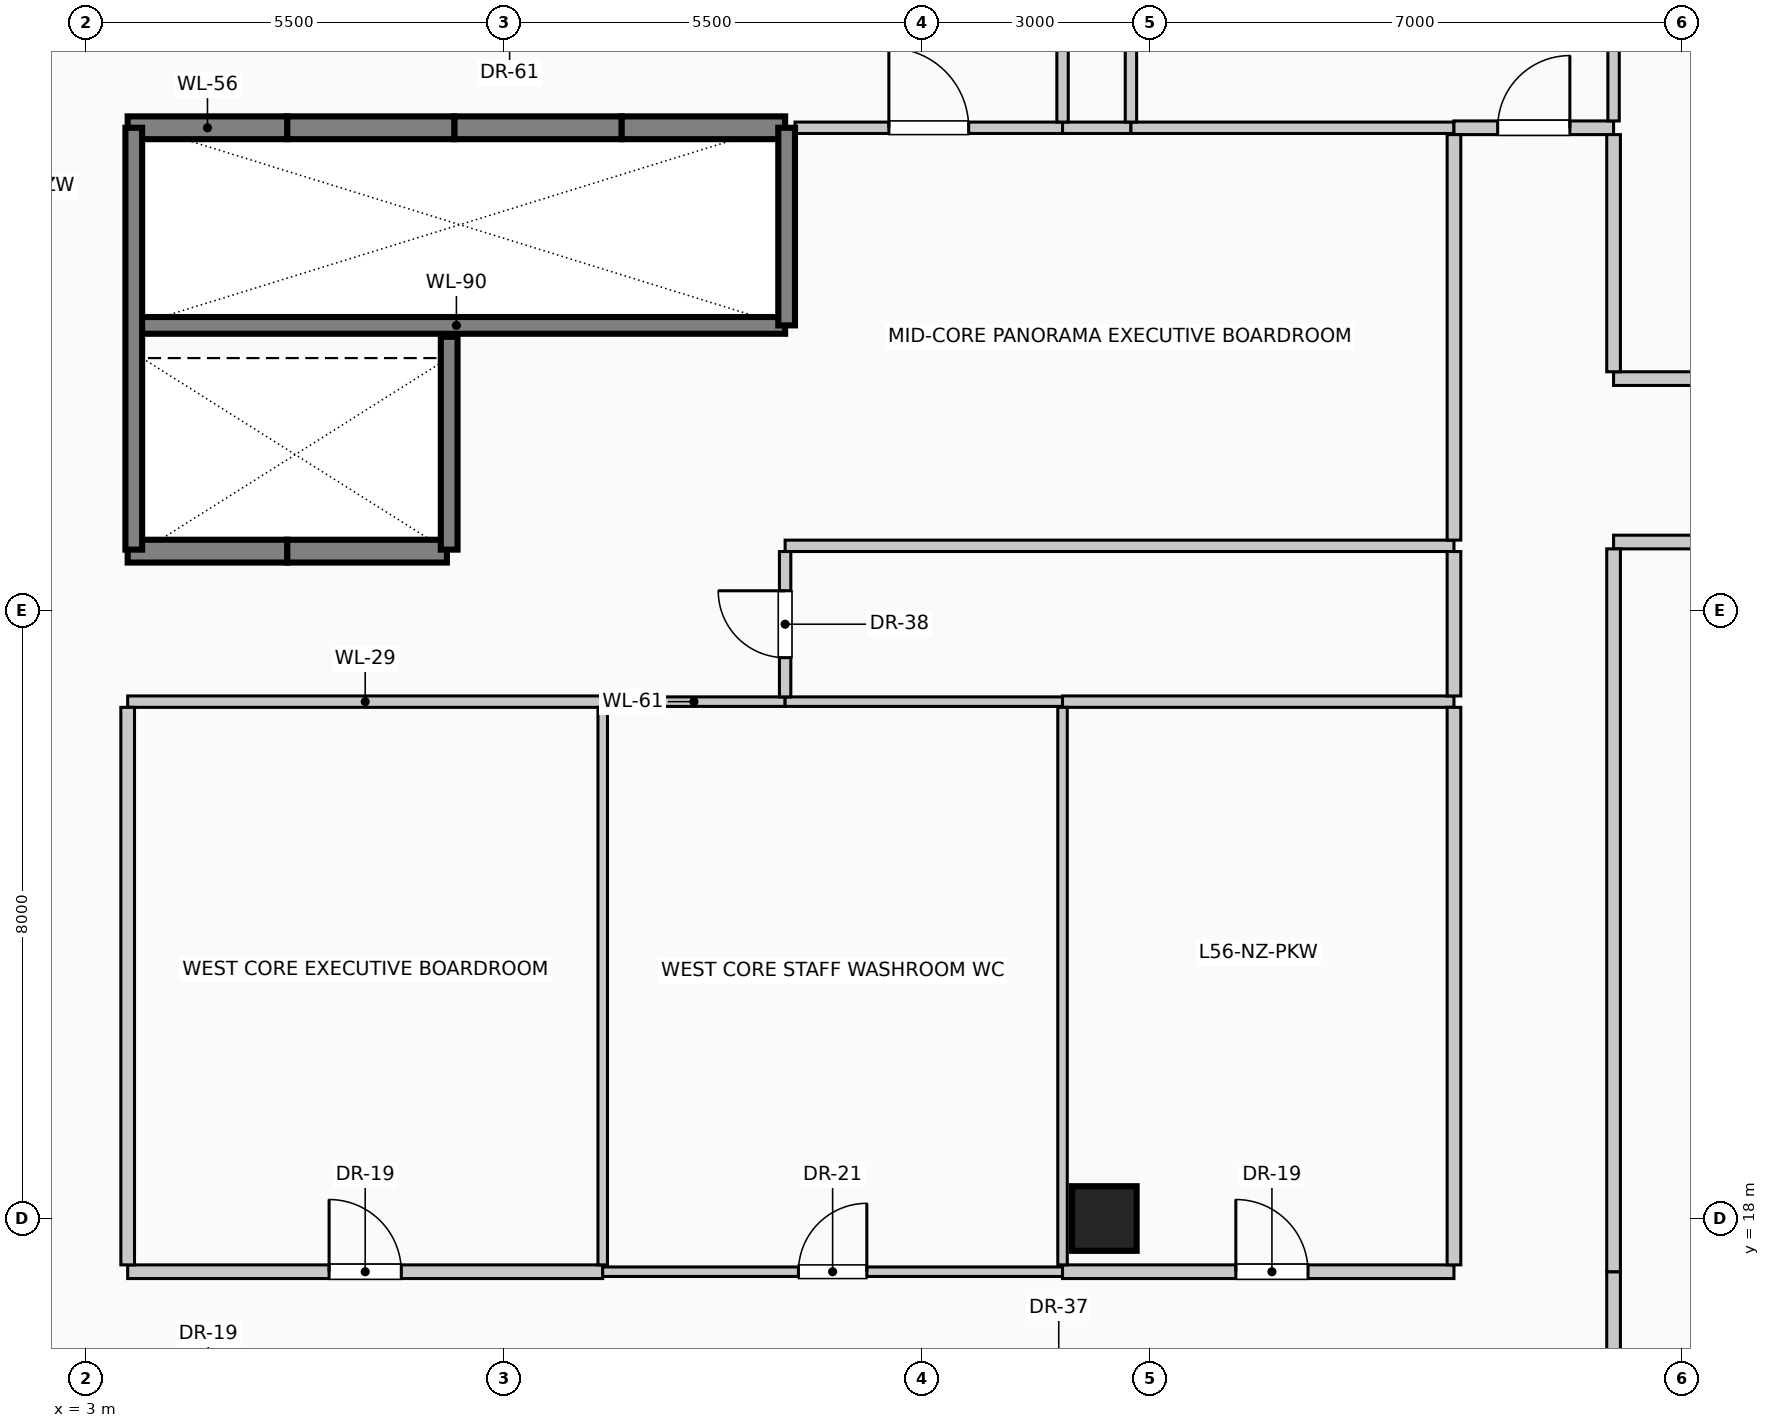
"""IFC4 building model, lengths in metres.
Left out: names, types, materials, properties, quantities, classifications, styles, units other than length and angle.
Written with IfcOpenShell. Run it as: python <this file> out.ifc"""

import sys

from ifc_helpers import new_model, si_unit, direction, frame, frame_2d, origin, origin_2d, place, context, subcontext, project, spatial, rectangle, circle, extrude, element, fill, save


model = new_model("IFC4")
c1 = context("Model", 3, precision=1e-05, world=origin(), true_north=direction((0.0, 1.0)))
c2 = subcontext(c1, "Body", "Model", "MODEL_VIEW")
j1 = project(units=[si_unit("LENGTHUNIT", "METRE"), si_unit("PLANEANGLEUNIT", "RADIAN")], contexts=[c1])
p1 = place(None, origin())
s1 = spatial("IfcSite", under=j1, at=p1, CompositionType="ELEMENT")
p2 = place(p1, origin())
s2 = spatial("IfcBuilding", under=s1, at=p2, CompositionType="ELEMENT")
p3 = place(p2, frame((0.0, 0.0, 230.6)))
s3 = spatial("IfcBuildingStorey", under=s2, at=p3, CompositionType="ELEMENT", Elevation=230.6)
p4 = place(p3, frame((16.4, 18.0, 0.0), z_axis=(0.0, 0.0, 1.0), x_axis=(1.0, 0.0, 0.0)))
e1 = element("IfcColumn", 1, at=p4, inside=s3, PredefinedType="COLUMN", context=c2, shape_type="SweptSolid", body=[
    extrude(circle(Radius=0.425, at=origin_2d()), origin(), (0.0, 0.0, 1.0), 4.0),
])
p5 = place(p3, frame((3.55, 32.35, 0.0), z_axis=(0.0, 0.0, 1.0), x_axis=(1.0, 0.0, 0.0)))
e2 = element("IfcWall", 2, at=p5, inside=s3, PredefinedType="SOLIDWALL", context=c2, shape_type="SweptSolid", body=[
    extrude(rectangle(XDim=2.1, YDim=0.3, at=frame_2d((1.05, 0.0))), origin(), (0.0, 0.0, 1.0), 4.0),
])
p6 = place(p3, frame((5.65, 32.35, 0.0), z_axis=(0.0, 0.0, 1.0), x_axis=(1.0, 0.0, 0.0)))
e3 = element("IfcWall", 3, at=p6, inside=s3, PredefinedType="SOLIDWALL", context=c2, shape_type="SweptSolid", body=[
    extrude(rectangle(XDim=2.2, YDim=0.3, at=frame_2d((1.1, 0.0))), origin(), (0.0, 0.0, 1.0), 4.0),
])
p7 = place(p3, frame((7.85, 32.35, 0.0), z_axis=(0.0, 0.0, 1.0), x_axis=(1.0, 0.0, 0.0)))
e4 = element("IfcWall", 4, at=p7, inside=s3, PredefinedType="SOLIDWALL", context=c2, shape_type="SweptSolid", body=[
    extrude(rectangle(XDim=2.2, YDim=0.3, at=frame_2d((1.1, 0.0))), origin(), (0.0, 0.0, 1.0), 4.0),
])
p8 = place(p3, frame((10.05, 32.35, 0.0), z_axis=(0.0, 0.0, 1.0), x_axis=(1.0, 0.0, 0.0)))
e5 = element("IfcWall", 5, at=p8, inside=s3, PredefinedType="SOLIDWALL", context=c2, shape_type="SweptSolid", body=[
    extrude(rectangle(XDim=2.15, YDim=0.3, at=frame_2d((1.075, 0.0))), origin(), (0.0, 0.0, 1.0), 4.0),
])
p9 = place(p3, frame((5.65, 26.78, 0.0), z_axis=(0.0, 0.0, 1.0), x_axis=(-1.0, 0.0, 0.0)))
e6 = element("IfcWall", 6, at=p9, inside=s3, PredefinedType="SOLIDWALL", context=c2, shape_type="SweptSolid", body=[
    extrude(rectangle(XDim=2.1, YDim=0.3, at=frame_2d((1.05, 0.0))), origin(), (0.0, 0.0, 1.0), 4.0),
])
p10 = place(p3, frame((7.75, 26.78, 0.0), z_axis=(0.0, 0.0, 1.0), x_axis=(-1.0, 0.0, 0.0)))
e7 = element("IfcWall", 7, at=p10, inside=s3, PredefinedType="SOLIDWALL", context=c2, shape_type="SweptSolid", body=[
    extrude(rectangle(XDim=2.1, YDim=0.3, at=frame_2d((1.05, 0.0))), origin(), (0.0, 0.0, 1.0), 4.0),
])
p11 = place(p3, frame((3.55, 29.75, 0.0), z_axis=(0.0, 0.0, 1.0), x_axis=(1.0, 0.0, 0.0)))
e8 = element("IfcWall", 8, at=p11, inside=s3, PredefinedType="SOLIDWALL", context=c2, shape_type="SweptSolid", body=[
    extrude(rectangle(XDim=8.65, YDim=0.22, at=frame_2d((4.325, 0.0))), origin(), (0.0, 0.0, 1.0), 4.0),
])
p12 = place(p3, frame((3.63, 26.8, 0.0), z_axis=(0.0, 0.0, 1.0), x_axis=(0.0, 1.0, 0.0)))
e9 = element("IfcWall", 9, at=p12, inside=s3, PredefinedType="SOLIDWALL", context=c2, shape_type="SweptSolid", body=[
    extrude(rectangle(XDim=5.55, YDim=0.22, at=frame_2d((2.775, 0.0))), origin(), (0.0, 0.0, 1.0), 4.0),
])
p13 = place(p3, frame((7.78, 26.8, 0.0), z_axis=(0.0, 0.0, 1.0), x_axis=(0.0, 1.0, 0.0)))
e10 = element("IfcWall", 10, at=p13, inside=s3, PredefinedType="SOLIDWALL", context=c2, shape_type="SweptSolid", body=[
    extrude(rectangle(XDim=2.8, YDim=0.22, at=frame_2d((1.4, 0.0))), origin(), (0.0, 0.0, 1.0), 4.0),
])
p14 = place(p3, frame((12.22, 29.75, 0.0), z_axis=(0.0, 0.0, 1.0), x_axis=(0.0, 1.0, 0.0)))
e11 = element("IfcWall", 11, at=p14, inside=s3, PredefinedType="SOLIDWALL", context=c2, shape_type="SweptSolid", body=[
    extrude(rectangle(XDim=2.6, YDim=0.22, at=frame_2d((1.3, 0.0))), origin(), (0.0, 0.0, 1.0), 4.0),
])
p15 = place(p3, frame((3.55, 17.3, 0.0), z_axis=(0.0, 0.0, 1.0), x_axis=(1.0, 0.0, 0.0)))
e12 = element("IfcWall", 12, at=p15, inside=s3, PredefinedType="PARTITIONING", context=c2, shape_type="SweptSolid", body=[
    extrude(rectangle(XDim=6.25, YDim=0.18, at=frame_2d((3.125, 0.0))), origin(), (0.0, 0.0, 1.0), 3.75),
])
p16 = place(p15, frame((2.65, 0.0, 0.0)))
e13 = element("IfcOpeningElement", 13, at=p16, cuts=e12, PredefinedType="OPENING", context=c2, shape_type="SweptSolid", body=[
    extrude(rectangle(XDim=0.95, YDim=2.15, at=frame_2d((0.475, 1.075))), frame((0.0, 0.1, 0.0), z_axis=(0.0, -1.0, 0.0), x_axis=(1.0, 0.0, 0.0)), (0.0, 0.0, 1.0), 0.2),
])
p17 = place(p3, frame((9.8, 17.3, 0.0), z_axis=(0.0, 0.0, 1.0), x_axis=(1.0, 0.0, 0.0)))
e14 = element("IfcWall", 14, at=p17, inside=s3, PredefinedType="PARTITIONING", context=c2, shape_type="SweptSolid", body=[
    extrude(rectangle(XDim=6.05, YDim=0.125, at=frame_2d((3.025, 0.0))), origin(), (0.0, 0.0, 1.0), 3.75),
])
p18 = place(p17, frame((2.575, 0.0, 0.0)))
e15 = element("IfcOpeningElement", 15, at=p18, cuts=e14, PredefinedType="OPENING", context=c2, shape_type="SweptSolid", body=[
    extrude(rectangle(XDim=0.9, YDim=2.1, at=frame_2d((0.45, 1.05))), frame((0.0, 0.073, 0.0), z_axis=(0.0, -1.0, 0.0), x_axis=(1.0, 0.0, 0.0)), (0.0, 0.0, 1.0), 0.145),
])
p19 = place(p3, frame((15.85, 17.3, 0.0), z_axis=(0.0, 0.0, 1.0), x_axis=(1.0, 0.0, 0.0)))
e16 = element("IfcWall", 16, at=p19, inside=s3, PredefinedType="PARTITIONING", context=c2, shape_type="SweptSolid", body=[
    extrude(rectangle(XDim=5.15, YDim=0.18, at=frame_2d((2.575, 0.0))), origin(), (0.0, 0.0, 1.0), 3.75),
])
p20 = place(p19, frame((2.28, 0.0, 0.0)))
e17 = element("IfcOpeningElement", 17, at=p20, cuts=e16, PredefinedType="OPENING", context=c2, shape_type="SweptSolid", body=[
    extrude(rectangle(XDim=0.95, YDim=2.15, at=frame_2d((0.475, 1.075))), frame((0.0, 0.1, 0.0), z_axis=(0.0, -1.0, 0.0), x_axis=(1.0, 0.0, 0.0)), (0.0, 0.0, 1.0), 0.2),
])
p21 = place(p3, frame((3.55, 24.8, 0.0), z_axis=(0.0, 0.0, 1.0), x_axis=(1.0, 0.0, 0.0)))
e18 = element("IfcWall", 18, at=p21, inside=s3, PredefinedType="PARTITIONING", context=c2, shape_type="SweptSolid", body=[
    extrude(rectangle(XDim=6.25, YDim=0.15, at=frame_2d((3.125, 0.0))), origin(), (0.0, 0.0, 1.0), 3.75),
])
p22 = place(p3, frame((9.8, 24.8, 0.0), z_axis=(0.0, 0.0, 1.0), x_axis=(1.0, 0.0, 0.0)))
e19 = element("IfcWall", 19, at=p22, inside=s3, PredefinedType="PARTITIONING", context=c2, shape_type="SweptSolid", body=[
    extrude(rectangle(XDim=2.4, YDim=0.125, at=frame_2d((1.2, 0.0))), origin(), (0.0, 0.0, 1.0), 3.75),
])
p23 = place(p3, frame((12.2, 24.8, 0.0), z_axis=(0.0, 0.0, 1.0), x_axis=(1.0, 0.0, 0.0)))
e20 = element("IfcWall", 20, at=p23, inside=s3, PredefinedType="PARTITIONING", context=c2, shape_type="SweptSolid", body=[
    extrude(rectangle(XDim=3.65, YDim=0.125, at=frame_2d((1.825, 0.0))), origin(), (0.0, 0.0, 1.0), 3.75),
])
p24 = place(p3, frame((15.85, 24.8, 0.0), z_axis=(0.0, 0.0, 1.0), x_axis=(1.0, 0.0, 0.0)))
e21 = element("IfcWall", 21, at=p24, inside=s3, PredefinedType="PARTITIONING", context=c2, shape_type="SweptSolid", body=[
    extrude(rectangle(XDim=5.15, YDim=0.15, at=frame_2d((2.575, 0.0))), origin(), (0.0, 0.0, 1.0), 3.75),
])
p25 = place(p3, frame((12.2, 26.85, 0.0), z_axis=(0.0, 0.0, 1.0), x_axis=(1.0, 0.0, 0.0)))
e22 = element("IfcWall", 22, at=p25, inside=s3, PredefinedType="PARTITIONING", context=c2, shape_type="SweptSolid", body=[
    extrude(rectangle(XDim=8.8, YDim=0.15, at=frame_2d((4.4, 0.0))), origin(), (0.0, 0.0, 1.0), 3.75),
])
p26 = place(p3, frame((23.1, 26.9, 0.0), z_axis=(0.0, 0.0, 1.0), x_axis=(1.0, 0.0, 0.0)))
e23 = element("IfcWall", 23, at=p26, inside=s3, PredefinedType="PARTITIONING", context=c2, shape_type="SweptSolid", body=[
    extrude(rectangle(XDim=9.1, YDim=0.18, at=frame_2d((4.55, 0.0))), origin(), (0.0, 0.0, 1.0), 3.75),
])
p27 = place(p26, frame((4.075, 0.0, 0.0)))
e24 = element("IfcOpeningElement", 24, at=p27, cuts=e23, PredefinedType="OPENING", context=c2, shape_type="SweptSolid", body=[
    extrude(rectangle(XDim=0.95, YDim=2.15, at=frame_2d((0.475, 1.075))), frame((0.0, 0.1, 0.0), z_axis=(0.0, -1.0, 0.0), x_axis=(1.0, 0.0, 0.0)), (0.0, 0.0, 1.0), 0.2),
])
p28 = place(p3, frame((23.1, 29.05, 0.0), z_axis=(0.0, 0.0, 1.0), x_axis=(1.0, 0.0, 0.0)))
e25 = element("IfcWall", 25, at=p28, inside=s3, PredefinedType="PARTITIONING", context=c2, shape_type="SweptSolid", body=[
    extrude(rectangle(XDim=3.66, YDim=0.18, at=frame_2d((1.83, 0.0))), origin(), (0.0, 0.0, 1.0), 3.75),
])
p29 = place(p28, frame((1.355, 0.0, 0.0)))
e26 = element("IfcOpeningElement", 26, at=p29, cuts=e25, PredefinedType="OPENING", context=c2, shape_type="SweptSolid", body=[
    extrude(rectangle(XDim=0.95, YDim=2.15, at=frame_2d((0.475, 1.075))), frame((0.0, 0.1, 0.0), z_axis=(0.0, -1.0, 0.0), x_axis=(1.0, 0.0, 0.0)), (0.0, 0.0, 1.0), 0.2),
])
p30 = place(p3, frame((12.33, 32.35, 0.0), z_axis=(0.0, 0.0, 1.0), x_axis=(1.0, 0.0, 0.0)))
e27 = element("IfcWall", 27, at=p30, inside=s3, PredefinedType="PARTITIONING", context=c2, shape_type="SweptSolid", body=[
    extrude(rectangle(XDim=3.52, YDim=0.15, at=frame_2d((1.76, 0.0))), origin(), (0.0, 0.0, 1.0), 3.75),
])
p31 = place(p30, frame((1.235, 0.0, 0.0)))
e28 = element("IfcOpeningElement", 28, at=p31, cuts=e27, PredefinedType="OPENING", context=c2, shape_type="SweptSolid", body=[
    extrude(rectangle(XDim=1.05, YDim=2.15, at=frame_2d((0.525, 1.075))), frame((0.0, 0.085, 0.0), z_axis=(0.0, -1.0, 0.0), x_axis=(1.0, 0.0, 0.0)), (0.0, 0.0, 1.0), 0.17),
])
p32 = place(p3, frame((15.85, 32.35, 0.0), z_axis=(0.0, 0.0, 1.0), x_axis=(1.0, 0.0, 0.0)))
e29 = element("IfcWall", 29, at=p32, inside=s3, PredefinedType="PARTITIONING", context=c2, shape_type="SweptSolid", body=[
    extrude(rectangle(XDim=0.9, YDim=0.15, at=frame_2d((0.45, 0.0))), origin(), (0.0, 0.0, 1.0), 3.75),
])
p33 = place(p3, frame((16.75, 32.35, 0.0), z_axis=(0.0, 0.0, 1.0), x_axis=(1.0, 0.0, 0.0)))
e30 = element("IfcWall", 30, at=p33, inside=s3, PredefinedType="PARTITIONING", context=c2, shape_type="SweptSolid", body=[
    extrude(rectangle(XDim=4.25, YDim=0.15, at=frame_2d((2.125, 0.0))), origin(), (0.0, 0.0, 1.0), 3.75),
])
p34 = place(p3, frame((21.0, 32.35, 0.0), z_axis=(0.0, 0.0, 1.0), x_axis=(1.0, 0.0, 0.0)))
e31 = element("IfcWall", 31, at=p34, inside=s3, PredefinedType="PARTITIONING", context=c2, shape_type="SweptSolid", body=[
    extrude(rectangle(XDim=2.1, YDim=0.18, at=frame_2d((1.05, 0.0))), origin(), (0.0, 0.0, 1.0), 3.75),
])
p35 = place(p34, frame((0.575, 0.0, 0.0)))
e32 = element("IfcOpeningElement", 32, at=p35, cuts=e31, PredefinedType="OPENING", context=c2, shape_type="SweptSolid", body=[
    extrude(rectangle(XDim=0.95, YDim=2.15, at=frame_2d((0.475, 1.075))), frame((0.0, 0.1, 0.0), z_axis=(0.0, -1.0, 0.0), x_axis=(1.0, 0.0, 0.0)), (0.0, 0.0, 1.0), 0.2),
])
p36 = place(p3, frame((3.55, 17.39, 0.0), z_axis=(0.0, 0.0, 1.0), x_axis=(0.0, 1.0, 0.0)))
e33 = element("IfcWall", 33, at=p36, inside=s3, PredefinedType="PARTITIONING", context=c2, shape_type="SweptSolid", body=[
    extrude(rectangle(XDim=7.335, YDim=0.18, at=frame_2d((3.667, 0.0))), origin(), (0.0, 0.0, 1.0), 3.75),
])
p37 = place(p3, frame((9.8, 17.39, 0.0), z_axis=(0.0, 0.0, 1.0), x_axis=(0.0, 1.0, 0.0)))
e34 = element("IfcWall", 34, at=p37, inside=s3, PredefinedType="PARTITIONING", context=c2, shape_type="SweptSolid", body=[
    extrude(rectangle(XDim=7.335, YDim=0.125, at=frame_2d((3.667, 0.0))), origin(), (0.0, 0.0, 1.0), 3.75),
])
p38 = place(p3, frame((12.2, 24.863, 0.0), z_axis=(0.0, 0.0, 1.0), x_axis=(0.0, 1.0, 0.0)))
e35 = element("IfcWall", 35, at=p38, inside=s3, PredefinedType="PARTITIONING", context=c2, shape_type="SweptSolid", body=[
    extrude(rectangle(XDim=1.912, YDim=0.15, at=frame_2d((0.956, 0.0))), origin(), (0.0, 0.0, 1.0), 3.75),
])
p39 = place(p38, frame((0.516, 0.0, 0.0)))
e36 = element("IfcOpeningElement", 36, at=p39, cuts=e35, PredefinedType="OPENING", context=c2, shape_type="SweptSolid", body=[
    extrude(rectangle(XDim=0.88, YDim=2.1, at=frame_2d((0.44, 1.05))), frame((0.0, 0.085, 0.0), z_axis=(0.0, -1.0, 0.0), x_axis=(1.0, 0.0, 0.0)), (0.0, 0.0, 1.0), 0.17),
])
p40 = place(p3, frame((15.85, 17.39, 0.0), z_axis=(0.0, 0.0, 1.0), x_axis=(0.0, 1.0, 0.0)))
e37 = element("IfcWall", 37, at=p40, inside=s3, PredefinedType="PARTITIONING", context=c2, shape_type="SweptSolid", body=[
    extrude(rectangle(XDim=7.335, YDim=0.125, at=frame_2d((3.667, 0.0))), origin(), (0.0, 0.0, 1.0), 3.75),
])
p41 = place(p3, frame((15.85, 32.425, 0.0), z_axis=(0.0, 0.0, 1.0), x_axis=(0.0, 1.0, 0.0)))
e38 = element("IfcWall", 38, at=p41, inside=s3, PredefinedType="PARTITIONING", context=c2, shape_type="SweptSolid", body=[
    extrude(rectangle(XDim=1.725, YDim=0.15, at=frame_2d((0.862, 0.0))), origin(), (0.0, 0.0, 1.0), 3.75),
])
p42 = place(p3, frame((16.75, 32.425, 0.0), z_axis=(0.0, 0.0, 1.0), x_axis=(0.0, 1.0, 0.0)))
e39 = element("IfcWall", 39, at=p42, inside=s3, PredefinedType="PARTITIONING", context=c2, shape_type="SweptSolid", body=[
    extrude(rectangle(XDim=1.15, YDim=0.15, at=frame_2d((0.575, 0.0))), origin(), (0.0, 0.0, 1.0), 3.75),
])
p43 = place(p3, frame((21.0, 17.39, 0.0), z_axis=(0.0, 0.0, 1.0), x_axis=(0.0, 1.0, 0.0)))
e40 = element("IfcWall", 40, at=p43, inside=s3, PredefinedType="PARTITIONING", context=c2, shape_type="SweptSolid", body=[
    extrude(rectangle(XDim=7.335, YDim=0.18, at=frame_2d((3.667, 0.0))), origin(), (0.0, 0.0, 1.0), 3.75),
])
p44 = place(p3, frame((21.0, 24.875, 0.0), z_axis=(0.0, 0.0, 1.0), x_axis=(0.0, 1.0, 0.0)))
e41 = element("IfcWall", 41, at=p44, inside=s3, PredefinedType="PARTITIONING", context=c2, shape_type="SweptSolid", body=[
    extrude(rectangle(XDim=1.9, YDim=0.18, at=frame_2d((0.95, 0.0))), origin(), (0.0, 0.0, 1.0), 3.75),
])
p45 = place(p3, frame((21.0, 26.925, 0.0), z_axis=(0.0, 0.0, 1.0), x_axis=(0.0, 1.0, 0.0)))
e42 = element("IfcWall", 42, at=p45, inside=s3, PredefinedType="PARTITIONING", context=c2, shape_type="SweptSolid", body=[
    extrude(rectangle(XDim=5.335, YDim=0.18, at=frame_2d((2.667, 0.0))), origin(), (0.0, 0.0, 1.0), 3.75),
])
p46 = place(p3, frame((23.1, 15.29, 0.0), z_axis=(0.0, 0.0, 1.0), x_axis=(0.0, 1.0, 0.0)))
e43 = element("IfcWall", 43, at=p46, inside=s3, PredefinedType="PARTITIONING", context=c2, shape_type="SweptSolid", body=[
    extrude(rectangle(XDim=2.01, YDim=0.18, at=frame_2d((1.005, 0.0))), origin(), (0.0, 0.0, 1.0), 3.75),
])
p47 = place(p3, frame((23.1, 17.3, 0.0), z_axis=(0.0, 0.0, 1.0), x_axis=(0.0, 1.0, 0.0)))
e44 = element("IfcWall", 44, at=p47, inside=s3, PredefinedType="PARTITIONING", context=c2, shape_type="SweptSolid", body=[
    extrude(rectangle(XDim=9.51, YDim=0.18, at=frame_2d((4.755, 0.0))), origin(), (0.0, 0.0, 1.0), 3.75),
])
p48 = place(p3, frame((23.1, 29.14, 0.0), z_axis=(0.0, 0.0, 1.0), x_axis=(0.0, 1.0, 0.0)))
e45 = element("IfcWall", 45, at=p48, inside=s3, PredefinedType="PARTITIONING", context=c2, shape_type="SweptSolid", body=[
    extrude(rectangle(XDim=3.12, YDim=0.18, at=frame_2d((1.56, 0.0))), origin(), (0.0, 0.0, 1.0), 3.75),
])
p49 = place(p3, frame((23.1, 32.44, 0.0), z_axis=(0.0, 0.0, 1.0), x_axis=(0.0, 1.0, 0.0)))
e46 = element("IfcWall", 46, at=p49, inside=s3, PredefinedType="PARTITIONING", context=c2, shape_type="SweptSolid", body=[
    extrude(rectangle(XDim=12.84, YDim=0.15, at=frame_2d((6.42, 0.0))), origin(), (0.0, 0.0, 1.0), 3.75),
])
p50 = place(p16, origin())
e47 = element("IfcDoor", 47, at=p50, inside=s3, OperationType="SINGLE_SWING_LEFT", PredefinedType="DOOR", context=c2, shape_type="SweptSolid", body=[
    extrude(rectangle(XDim=0.95, YDim=2.15, at=frame_2d((0.475, 1.075))), frame((0.0, 0.025, 0.0), z_axis=(0.0, -1.0, 0.0), x_axis=(1.0, 0.0, 0.0)), (0.0, 0.0, 1.0), 0.05),
])
fill(e13, e47)
p51 = place(p18, origin())
e48 = element("IfcDoor", 48, at=p51, inside=s3, OperationType="SINGLE_SWING_RIGHT", PredefinedType="DOOR", context=c2, shape_type="SweptSolid", body=[
    extrude(rectangle(XDim=0.9, YDim=2.1, at=frame_2d((0.45, 1.05))), frame((0.0, 0.025, 0.0), z_axis=(0.0, -1.0, 0.0), x_axis=(1.0, 0.0, 0.0)), (0.0, 0.0, 1.0), 0.05),
])
fill(e15, e48)
p52 = place(p20, origin())
e49 = element("IfcDoor", 49, at=p52, inside=s3, OperationType="SINGLE_SWING_LEFT", PredefinedType="DOOR", context=c2, shape_type="SweptSolid", body=[
    extrude(rectangle(XDim=0.95, YDim=2.15, at=frame_2d((0.475, 1.075))), frame((0.0, 0.025, 0.0), z_axis=(0.0, -1.0, 0.0), x_axis=(1.0, 0.0, 0.0)), (0.0, 0.0, 1.0), 0.05),
])
fill(e17, e49)
p53 = place(p31, origin())
e50 = element("IfcDoor", 50, at=p53, inside=s3, OperationType="SINGLE_SWING_LEFT", PredefinedType="DOOR", context=c2, shape_type="SweptSolid", body=[
    extrude(rectangle(XDim=1.05, YDim=2.15, at=frame_2d((0.525, 1.075))), frame((0.0, 0.025, 0.0), z_axis=(0.0, -1.0, 0.0), x_axis=(1.0, 0.0, 0.0)), (0.0, 0.0, 1.0), 0.05),
])
fill(e28, e50)
p54 = place(p35, origin())
e51 = element("IfcDoor", 51, at=p54, inside=s3, OperationType="SINGLE_SWING_RIGHT", PredefinedType="DOOR", context=c2, shape_type="SweptSolid", body=[
    extrude(rectangle(XDim=0.95, YDim=2.15, at=frame_2d((0.475, 1.075))), frame((0.0, 0.025, 0.0), z_axis=(0.0, -1.0, 0.0), x_axis=(1.0, 0.0, 0.0)), (0.0, 0.0, 1.0), 0.05),
])
fill(e32, e51)
p55 = place(p39, origin())
e52 = element("IfcDoor", 52, at=p55, inside=s3, OperationType="SINGLE_SWING_RIGHT", PredefinedType="DOOR", context=c2, shape_type="SweptSolid", body=[
    extrude(rectangle(XDim=0.88, YDim=2.1, at=frame_2d((0.44, 1.05))), frame((0.0, 0.025, 0.0), z_axis=(0.0, -1.0, 0.0), x_axis=(1.0, 0.0, 0.0)), (0.0, 0.0, 1.0), 0.05),
])
fill(e36, e52)
save(model, sys.argv[1])
